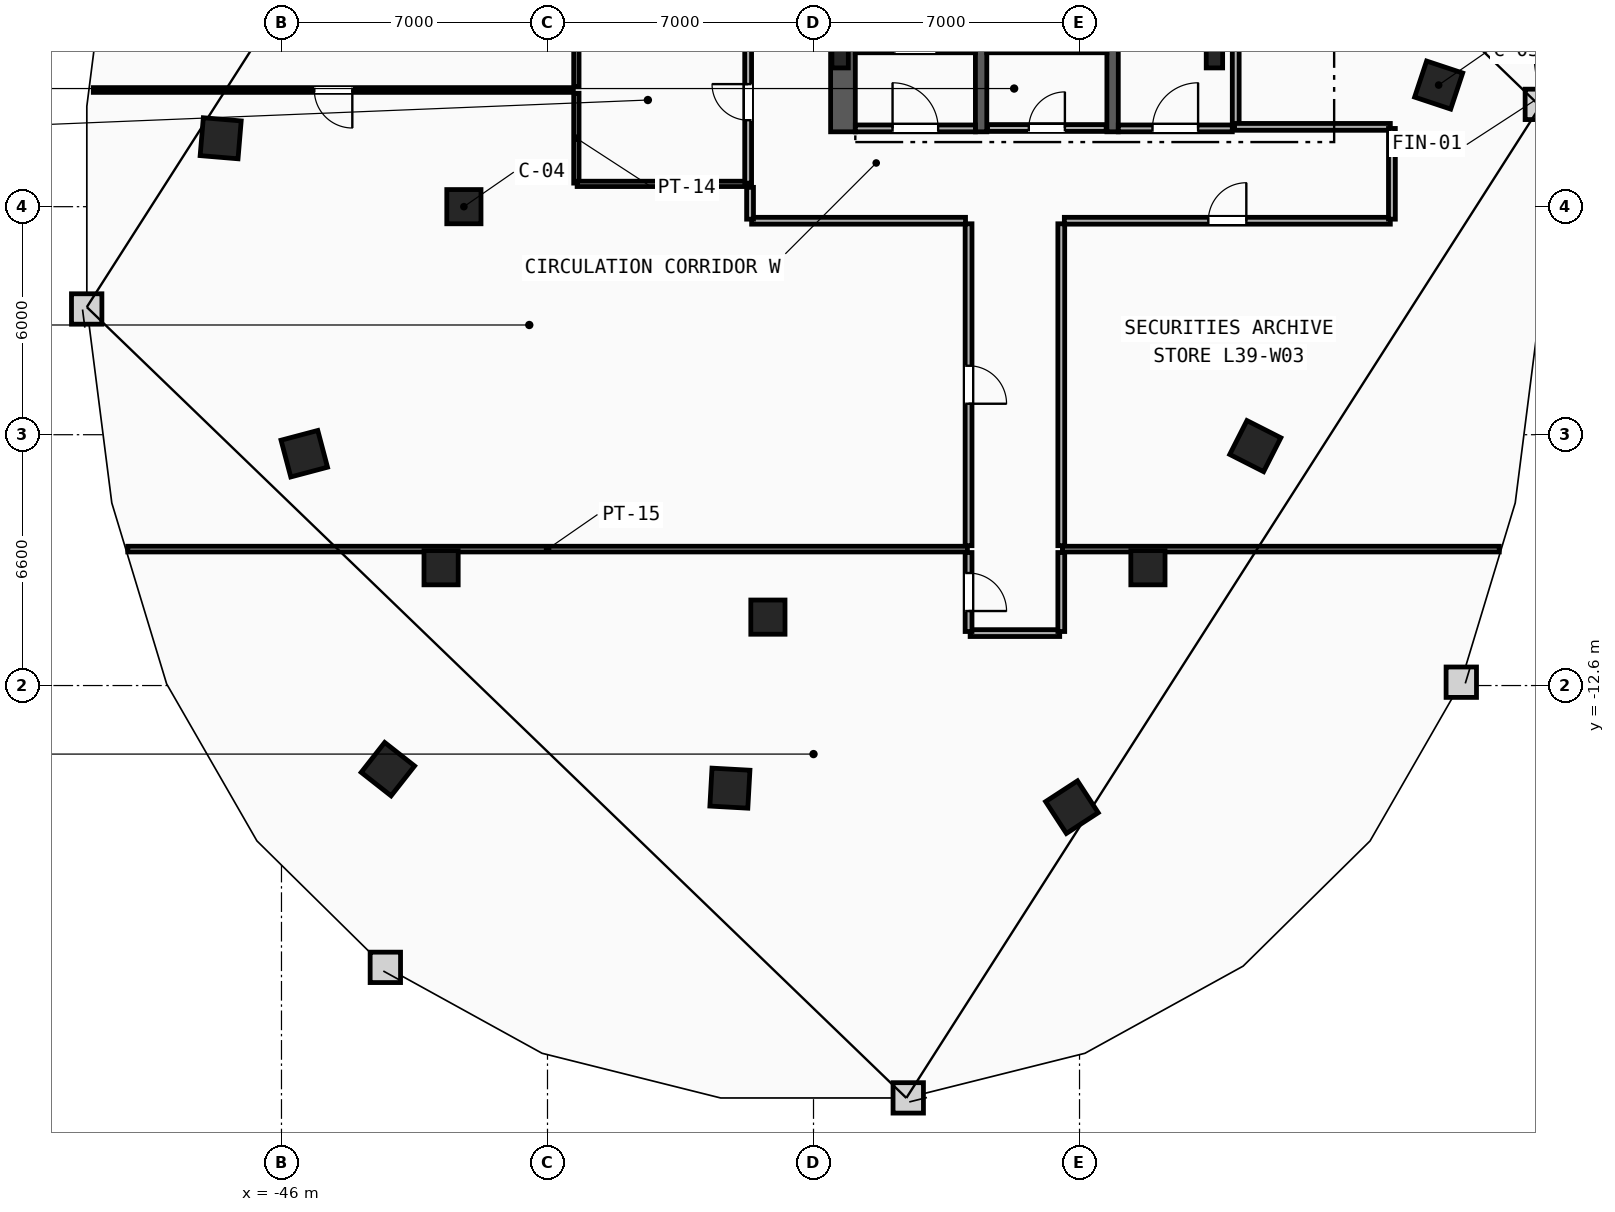
"""IFC4 building model, lengths in metres.
Left out: names, types, materials, properties, quantities, classifications, styles, units other than length and angle.
Written with IfcOpenShell. Run it as: python <this file> out.ifc"""

import sys

from ifc_helpers import new_model, si_unit, direction, frame, frame_2d, origin, origin_2d, place, context, subcontext, project, spatial, rectangle, i_section, extrude, element, fill, save


model = new_model("IFC4")
c1 = context("Model", 3, precision=1e-05, world=origin(), true_north=direction((0.0, 1.0)))
c2 = subcontext(c1, "Body", "Model", "MODEL_VIEW")
j1 = project(units=[si_unit("LENGTHUNIT", "METRE"), si_unit("PLANEANGLEUNIT", "RADIAN")], contexts=[c1])
p1 = place(None, origin())
s1 = spatial("IfcSite", under=j1, at=p1, CompositionType="ELEMENT")
p2 = place(p1, origin())
s2 = spatial("IfcBuilding", under=s1, at=p2, CompositionType="ELEMENT")
p3 = place(p2, frame((0.0, 0.0, 151.2)))
s3 = spatial("IfcBuildingStorey", under=s2, at=p3, CompositionType="ELEMENT", Elevation=151.2)
for number, where, z_axis, x_axis in (
    (1, (-31.3, 3.9, 0.0), (0.0, 0.0, 1.0), (1.0, 0.0, 0.0)),
    (2, (-21.45, 3.9, 0.0), (0.0, 0.0, 1.0), (1.0, 0.0, 0.0)),
):
    element("IfcColumn", number, at=place(p3, frame(where, z_axis=z_axis, x_axis=x_axis)), inside=s3, PredefinedType="COLUMN", context=c2, shape_type="SweptSolid", body=[
        extrude(i_section(OverallWidth=0.432, OverallDepth=0.498, WebThickness=0.056, FlangeThickness=0.089, FilletRadius=0.018, at=origin_2d()), origin(), (0.0, 0.0, 1.0), 3.6),
    ])
for number, where, z_axis, x_axis in (
    (3, (-41.2, 0.0, 0.0), (0.0, 0.0, 1.0), (1.0, 0.0, 0.0)),
    (4, (-41.8, -9.5, 0.0), (0.0, 0.0, 1.0), (1.0, 0.0, 0.0)),
    (5, (-33.2, -10.8, 0.0), (0.0, 0.0, 1.0), (1.0, 0.0, 0.0)),
    (6, (-23.2, -9.5, 0.0), (0.0, 0.0, 1.0), (1.0, 0.0, 0.0)),
):
    element("IfcColumn", number, at=place(p3, frame(where, z_axis=z_axis, x_axis=x_axis)), inside=s3, PredefinedType="COLUMN", context=c2, shape_type="SweptSolid", body=[
        extrude(rectangle(XDim=0.9, YDim=0.9, at=origin_2d()), origin(), (0.0, 0.0, 1.0), 3.6),
    ])
for number, where, z_axis, x_axis in (
    (7, (-15.55, 3.2, 0.0), (0.0, 0.0, 1.0), (0.315, 0.949, 0.0)),
    (8, (-47.6, 1.8, 0.0), (0.0, 0.0, 1.0), (-0.084, -0.997, 0.0)),
    (9, (-45.4, -6.5, 0.0), (0.0, 0.0, 1.0), (0.256, -0.967, 0.0)),
    (10, (-43.2, -14.8, 0.0), (0.0, 0.0, 1.0), (0.786, -0.618, 0.0)),
    (11, (-34.2, -15.3, 0.0), (0.0, 0.0, 1.0), (0.998, -0.055, 0.0)),
    (12, (-25.2, -15.8, 0.0), (0.0, 0.0, 1.0), (0.838, 0.546, 0.0)),
    (13, (-20.375, -6.3, 0.0), (0.0, 0.0, 1.0), (0.453, 0.892, 0.0)),
):
    element("IfcColumn", number, at=place(p3, frame(where, z_axis=z_axis, x_axis=x_axis)), inside=s3, PredefinedType="COLUMN", context=c2, shape_type="SweptSolid", body=[
        extrude(rectangle(XDim=1.0, YDim=1.0, at=origin_2d()), origin(), (0.0, 0.0, 1.0), 3.6),
    ])
p4 = place(p3, frame((-31.225, 1.97, 0.0), z_axis=(0.0, 0.0, 1.0), x_axis=(0.0, 1.0, 0.0)))
e14 = element("IfcWall", 14, at=p4, inside=s3, PredefinedType="SHEAR", context=c2, shape_type="SweptSolid", body=[
    extrude(rectangle(XDim=13.33, YDim=0.65, at=frame_2d((6.665, 0.0))), origin(), (0.0, 0.0, 1.0), 3.36),
])
for number, where, z_axis, x_axis in (
    (15, (-27.59, 1.97, 0.0), (0.0, 0.0, 1.0), (0.0, 1.0, 0.0)),
    (16, (-24.13, 1.97, 0.0), (0.0, 0.0, 1.0), (0.0, 1.0, 0.0)),
):
    element("IfcWall", number, at=place(p3, frame(where, z_axis=z_axis, x_axis=x_axis)), inside=s3, PredefinedType="SHEAR", context=c2, shape_type="SweptSolid", body=[
        extrude(rectangle(XDim=10.68, YDim=0.3, at=frame_2d((5.34, 0.0))), origin(), (0.0, 0.0, 1.0), 3.36),
    ])
p5 = place(p3, frame((-30.9, 4.2, 0.0), z_axis=(0.0, 0.0, 1.0), x_axis=(1.0, 0.0, 0.0)))
e17 = element("IfcWall", 17, at=p5, inside=s3, PredefinedType="SHEAR", context=c2, shape_type="SweptSolid", body=[
    extrude(rectangle(XDim=3.16, YDim=0.3, at=frame_2d((1.58, 0.0))), origin(), (0.0, 0.0, 1.0), 3.36),
])
p6 = place(p5, frame((1.03, 0.0, 0.0)))
e18 = element("IfcOpeningElement", 18, at=p6, cuts=e17, PredefinedType="OPENING", context=c2, shape_type="SweptSolid", body=[
    extrude(rectangle(XDim=1.1, YDim=2.15, at=frame_2d((0.55, 1.075))), frame((0.0, 0.16, 0.0), z_axis=(0.0, -1.0, 0.0), x_axis=(1.0, 0.0, 0.0)), (0.0, 0.0, 1.0), 0.32),
])
p7 = place(p3, frame((-27.44, 4.2, 0.0), z_axis=(0.0, 0.0, 1.0), x_axis=(1.0, 0.0, 0.0)))
e19 = element("IfcWall", 19, at=p7, inside=s3, PredefinedType="SHEAR", context=c2, shape_type="SweptSolid", body=[
    extrude(rectangle(XDim=3.16, YDim=0.3, at=frame_2d((1.58, 0.0))), origin(), (0.0, 0.0, 1.0), 3.36),
])
p8 = place(p3, frame((-20.89, 2.15, 0.0), z_axis=(0.0, 0.0, 1.0), x_axis=(0.0, 1.0, 0.0)))
e20 = element("IfcWall", 20, at=p8, inside=s3, PredefinedType="PARTITIONING", context=c2, shape_type="SweptSolid", body=[
    extrude(rectangle(XDim=5.3, YDim=0.18, at=frame_2d((2.65, 0.0))), origin(), (0.0, 0.0, 1.0), 3.36),
])
p9 = place(p3, frame((-23.98, 2.06, 0.0), z_axis=(0.0, 0.0, 1.0), x_axis=(1.0, 0.0, 0.0)))
e21 = element("IfcWall", 21, at=p9, inside=s3, PredefinedType="PARTITIONING", context=c2, shape_type="SweptSolid", body=[
    extrude(rectangle(XDim=3.0, YDim=0.18, at=frame_2d((1.5, 0.0))), origin(), (0.0, 0.0, 1.0), 3.36),
])
p10 = place(p9, frame((0.9, 0.0, 0.0)))
e22 = element("IfcOpeningElement", 22, at=p10, cuts=e21, PredefinedType="OPENING", context=c2, shape_type="SweptSolid", body=[
    extrude(rectangle(XDim=1.2, YDim=2.15, at=frame_2d((0.6, 1.075))), frame((0.0, 0.1, 0.0), z_axis=(0.0, -1.0, 0.0), x_axis=(1.0, 0.0, 0.0)), (0.0, 0.0, 1.0), 0.2),
])
p11 = place(p3, frame((-30.9, 2.06, 0.0), z_axis=(0.0, 0.0, 1.0), x_axis=(1.0, 0.0, 0.0)))
e23 = element("IfcWall", 23, at=p11, inside=s3, PredefinedType="PARTITIONING", context=c2, shape_type="SweptSolid", body=[
    extrude(rectangle(XDim=3.16, YDim=0.18, at=frame_2d((1.58, 0.0))), origin(), (0.0, 0.0, 1.0), 3.36),
])
p12 = place(p11, frame((0.98, 0.0, 0.0)))
e24 = element("IfcOpeningElement", 24, at=p12, cuts=e23, PredefinedType="OPENING", context=c2, shape_type="SweptSolid", body=[
    extrude(rectangle(XDim=1.2, YDim=2.15, at=frame_2d((0.6, 1.075))), frame((0.0, 0.1, 0.0), z_axis=(0.0, -1.0, 0.0), x_axis=(1.0, 0.0, 0.0)), (0.0, 0.0, 1.0), 0.2),
])
p13 = place(p3, frame((-27.42, 2.07, 0.0), z_axis=(0.0, 0.0, 1.0), x_axis=(1.0, 0.0, 0.0)))
e25 = element("IfcWall", 25, at=p13, inside=s3, PredefinedType="PARTITIONING", context=c2, shape_type="SweptSolid", body=[
    extrude(rectangle(XDim=3.12, YDim=0.18, at=frame_2d((1.56, 0.0))), origin(), (0.0, 0.0, 1.0), 3.36),
])
p14 = place(p13, frame((1.085, 0.0, 0.0)))
e26 = element("IfcOpeningElement", 26, at=p14, cuts=e25, PredefinedType="OPENING", context=c2, shape_type="SweptSolid", body=[
    extrude(rectangle(XDim=0.95, YDim=2.1, at=frame_2d((0.475, 1.05))), frame((0.0, 0.1, 0.0), z_axis=(0.0, -1.0, 0.0), x_axis=(1.0, 0.0, 0.0)), (0.0, 0.0, 1.0), 0.2),
])
p15 = place(p3, frame((-38.24, 0.62, 0.0), z_axis=(0.0, 0.0, 1.0), x_axis=(0.0, 1.0, 0.0)))
e27 = element("IfcWall", 27, at=p15, inside=s3, PredefinedType="PARTITIONING", context=c2, shape_type="SweptSolid", body=[
    extrude(rectangle(XDim=2.365, YDim=0.14, at=frame_2d((1.183, 0.0))), origin(), (0.0, 0.0, 1.0), 3.36),
])
p16 = place(p3, frame((-38.24, 3.155, 0.0), z_axis=(0.0, 0.0, 1.0), x_axis=(0.0, 1.0, 0.0)))
e28 = element("IfcWall", 28, at=p16, inside=s3, PredefinedType="PARTITIONING", context=c2, shape_type="SweptSolid", body=[
    extrude(rectangle(XDim=1.74, YDim=0.14, at=frame_2d((0.87, 0.0))), origin(), (0.0, 0.0, 1.0), 3.36),
])
p17 = place(p3, frame((-38.22, 0.6, 0.0), z_axis=(0.0, 0.0, 1.0), x_axis=(1.0, 0.0, 0.0)))
e29 = element("IfcWall", 29, at=p17, inside=s3, PredefinedType="PARTITIONING", context=c2, shape_type="SweptSolid", body=[
    extrude(rectangle(XDim=4.48, YDim=0.14, at=frame_2d((2.24, 0.0))), origin(), (0.0, 0.0, 1.0), 3.36),
])
p18 = place(p3, frame((-33.72, 0.62, 0.0), z_axis=(0.0, 0.0, 1.0), x_axis=(0.0, 1.0, 0.0)))
e30 = element("IfcWall", 30, at=p18, inside=s3, PredefinedType="PARTITIONING", context=c2, shape_type="SweptSolid", body=[
    extrude(rectangle(XDim=4.26, YDim=0.18, at=frame_2d((2.13, 0.0))), origin(), (0.0, 0.0, 1.0), 3.36),
])
p19 = place(p18, frame((1.655, 0.0, 0.0)))
e31 = element("IfcOpeningElement", 31, at=p19, cuts=e30, PredefinedType="OPENING", context=c2, shape_type="SweptSolid", body=[
    extrude(rectangle(XDim=0.95, YDim=2.1, at=frame_2d((0.475, 1.05))), frame((0.0, 0.1, 0.0), z_axis=(0.0, -1.0, 0.0), x_axis=(1.0, 0.0, 0.0)), (0.0, 0.0, 1.0), 0.2),
])
p20 = place(p3, frame((-50.045, -9.01, 0.0), z_axis=(0.0, 0.0, 1.0), x_axis=(1.0, 0.0, 0.0)))
e32 = element("IfcWall", 32, at=p20, inside=s3, PredefinedType="PARTITIONING", context=c2, shape_type="SweptSolid", body=[
    extrude(rectangle(XDim=22.095, YDim=0.15, at=frame_2d((11.048, 0.0))), origin(), (0.0, 0.0, 1.0), 3.36),
])
p21 = place(p3, frame((-25.45, -9.01, 0.0), z_axis=(0.0, 0.0, 1.0), x_axis=(1.0, 0.0, 0.0)))
e33 = element("IfcWall", 33, at=p21, inside=s3, PredefinedType="PARTITIONING", context=c2, shape_type="SweptSolid", body=[
    extrude(rectangle(XDim=11.495, YDim=0.15, at=frame_2d((5.748, 0.0))), origin(), (0.0, 0.0, 1.0), 3.36),
])
p22 = place(p3, frame((-27.878, -11.22, 0.0), z_axis=(0.0, 0.0, 1.0), x_axis=(1.0, 0.0, 0.0)))
e34 = element("IfcWall", 34, at=p22, inside=s3, PredefinedType="PARTITIONING", context=c2, shape_type="SweptSolid", body=[
    extrude(rectangle(XDim=2.357, YDim=0.18, at=frame_2d((1.178, 0.0))), origin(), (0.0, 0.0, 1.0), 3.36),
])
p23 = place(p3, frame((-27.92, -9.1, 0.0), z_axis=(0.0, 0.0, 1.0), x_axis=(0.0, -1.0, 0.0)))
e35 = element("IfcWall", 35, at=p23, inside=s3, PredefinedType="PARTITIONING", context=c2, shape_type="SweptSolid", body=[
    extrude(rectangle(XDim=2.078, YDim=0.18, at=frame_2d((1.039, 0.0))), origin(), (0.0, 0.0, 1.0), 3.36),
])
p24 = place(p23, frame((0.539, 0.0, 0.0)))
e36 = element("IfcOpeningElement", 36, at=p24, cuts=e35, PredefinedType="OPENING", context=c2, shape_type="SweptSolid", body=[
    extrude(rectangle(XDim=1.0, YDim=2.15, at=frame_2d((0.5, 1.075))), frame((0.0, 0.1, 0.0), z_axis=(0.0, -1.0, 0.0), x_axis=(1.0, 0.0, 0.0)), (0.0, 0.0, 1.0), 0.2),
])
p25 = place(p3, frame((-25.48, -11.178, 0.0), z_axis=(0.0, 0.0, 1.0), x_axis=(0.0, 1.0, 0.0)))
e37 = element("IfcWall", 37, at=p25, inside=s3, PredefinedType="PARTITIONING", context=c2, shape_type="SweptSolid", body=[
    extrude(rectangle(XDim=2.078, YDim=0.18, at=frame_2d((1.039, 0.0))), origin(), (0.0, 0.0, 1.0), 3.36),
])
p26 = place(p3, frame((-27.92, -0.45, 0.0), z_axis=(0.0, 0.0, 1.0), x_axis=(0.0, -1.0, 0.0)))
e38 = element("IfcWall", 38, at=p26, inside=s3, PredefinedType="PARTITIONING", context=c2, shape_type="SweptSolid", body=[
    extrude(rectangle(XDim=8.47, YDim=0.18, at=frame_2d((4.235, 0.0))), origin(), (0.0, 0.0, 1.0), 3.36),
])
p27 = place(p26, frame((3.735, 0.0, 0.0)))
e39 = element("IfcOpeningElement", 39, at=p27, cuts=e38, PredefinedType="OPENING", context=c2, shape_type="SweptSolid", body=[
    extrude(rectangle(XDim=1.0, YDim=2.15, at=frame_2d((0.5, 1.075))), frame((0.0, 0.1, 0.0), z_axis=(0.0, -1.0, 0.0), x_axis=(1.0, 0.0, 0.0)), (0.0, 0.0, 1.0), 0.2),
])
p28 = place(p3, frame((-33.628, -0.37, 0.0), z_axis=(0.0, 0.0, 1.0), x_axis=(1.0, 0.0, 0.0)))
e40 = element("IfcWall", 40, at=p28, inside=s3, PredefinedType="PARTITIONING", context=c2, shape_type="SweptSolid", body=[
    extrude(rectangle(XDim=5.628, YDim=0.18, at=frame_2d((2.814, 0.0))), origin(), (0.0, 0.0, 1.0), 3.36),
])
p29 = place(p3, frame((-33.67, 0.509, 0.0), z_axis=(0.0, 0.0, 1.0), x_axis=(0.0, -1.0, 0.0)))
e41 = element("IfcWall", 41, at=p29, inside=s3, PredefinedType="PARTITIONING", context=c2, shape_type="SweptSolid", body=[
    extrude(rectangle(XDim=0.837, YDim=0.18, at=frame_2d((0.418, 0.0))), origin(), (0.0, 0.0, 1.0), 3.36),
])
p30 = place(p3, frame((-25.4, -0.37, 0.0), z_axis=(0.0, 0.0, 1.0), x_axis=(1.0, 0.0, 0.0)))
e42 = element("IfcWall", 42, at=p30, inside=s3, PredefinedType="PARTITIONING", context=c2, shape_type="SweptSolid", body=[
    extrude(rectangle(XDim=8.578, YDim=0.18, at=frame_2d((4.289, 0.0))), origin(), (0.0, 0.0, 1.0), 3.36),
])
p31 = place(p30, frame((3.789, 0.0, 0.0)))
e43 = element("IfcOpeningElement", 43, at=p31, cuts=e42, PredefinedType="OPENING", context=c2, shape_type="SweptSolid", body=[
    extrude(rectangle(XDim=1.0, YDim=2.15, at=frame_2d((0.5, 1.075))), frame((0.0, 0.1, 0.0), z_axis=(0.0, -1.0, 0.0), x_axis=(1.0, 0.0, 0.0)), (0.0, 0.0, 1.0), 0.2),
])
p32 = place(p3, frame((-25.48, -8.92, 0.0), z_axis=(0.0, 0.0, 1.0), x_axis=(0.0, 1.0, 0.0)))
e44 = element("IfcWall", 44, at=p32, inside=s3, PredefinedType="PARTITIONING", context=c2, shape_type="SweptSolid", body=[
    extrude(rectangle(XDim=8.47, YDim=0.18, at=frame_2d((4.235, 0.0))), origin(), (0.0, 0.0, 1.0), 3.36),
])
p33 = place(p3, frame((-16.822, 2.1, 0.0), z_axis=(0.0, 0.0, 1.0), x_axis=(-1.0, 0.0, 0.0)))
e45 = element("IfcWall", 45, at=p33, inside=s3, PredefinedType="PARTITIONING", context=c2, shape_type="SweptSolid", body=[
    extrude(rectangle(XDim=4.098, YDim=0.18, at=frame_2d((2.049, 0.0))), origin(), (0.0, 0.0, 1.0), 3.36),
])
p34 = place(p3, frame((-16.78, -0.329, 0.0), z_axis=(0.0, 0.0, 1.0), x_axis=(0.0, 1.0, 0.0)))
e46 = element("IfcWall", 46, at=p34, inside=s3, PredefinedType="PARTITIONING", context=c2, shape_type="SweptSolid", body=[
    extrude(rectangle(XDim=2.387, YDim=0.18, at=frame_2d((1.194, 0.0))), origin(), (0.0, 0.0, 1.0), 3.36),
])
p35 = place(p3, frame((-38.32, 3.07, 0.0), z_axis=(0.0, 0.0, 1.0), x_axis=(-1.0, 0.0, 0.0)))
e47 = element("IfcWall", 47, at=p35, inside=s3, PredefinedType="PARTITIONING", context=c2, shape_type="SweptSolid", body=[
    extrude(rectangle(XDim=12.631, YDim=0.125, at=frame_2d((6.316, 0.0))), origin(), (0.0, 0.0, 1.0), 3.36),
])
p36 = place(p35, frame((5.816, 0.0, 0.0)))
e48 = element("IfcOpeningElement", 48, at=p36, cuts=e47, PredefinedType="OPENING", context=c2, shape_type="SweptSolid", body=[
    extrude(rectangle(XDim=1.0, YDim=2.15, at=frame_2d((0.5, 1.075))), frame((0.0, 0.073, 0.0), z_axis=(0.0, -1.0, 0.0), x_axis=(1.0, 0.0, 0.0)), (0.0, 0.0, 1.0), 0.145),
])
p37 = place(p10, origin())
e49 = element("IfcDoor", 49, at=p37, inside=s3, OperationType="SINGLE_SWING_RIGHT", PredefinedType="DOOR", context=c2, shape_type="SweptSolid", body=[
    extrude(rectangle(XDim=1.2, YDim=2.15, at=frame_2d((0.6, 1.075))), frame((0.0, 0.025, 0.0), z_axis=(0.0, -1.0, 0.0), x_axis=(1.0, 0.0, 0.0)), (0.0, 0.0, 1.0), 0.05),
])
fill(e22, e49)
p38 = place(p12, origin())
e50 = element("IfcDoor", 50, at=p38, inside=s3, OperationType="SINGLE_SWING_LEFT", PredefinedType="DOOR", context=c2, shape_type="SweptSolid", body=[
    extrude(rectangle(XDim=1.2, YDim=2.15, at=frame_2d((0.6, 1.075))), frame((0.0, 0.025, 0.0), z_axis=(0.0, -1.0, 0.0), x_axis=(1.0, 0.0, 0.0)), (0.0, 0.0, 1.0), 0.05),
])
fill(e24, e50)
p39 = place(p36, origin())
e51 = element("IfcDoor", 51, at=p39, inside=s3, OperationType="SINGLE_SWING_LEFT", PredefinedType="DOOR", context=c2, shape_type="SweptSolid", body=[
    extrude(rectangle(XDim=1.0, YDim=2.15, at=frame_2d((0.5, 1.075))), frame((0.0, 0.025, 0.0), z_axis=(0.0, -1.0, 0.0), x_axis=(1.0, 0.0, 0.0)), (0.0, 0.0, 1.0), 0.05),
])
fill(e48, e51)
p40 = place(p31, origin())
e52 = element("IfcDoor", 52, at=p40, inside=s3, OperationType="SINGLE_SWING_RIGHT", PredefinedType="DOOR", context=c2, shape_type="SweptSolid", body=[
    extrude(rectangle(XDim=1.0, YDim=2.15, at=frame_2d((0.5, 1.075))), frame((0.0, 0.025, 0.0), z_axis=(0.0, -1.0, 0.0), x_axis=(1.0, 0.0, 0.0)), (0.0, 0.0, 1.0), 0.05),
])
fill(e43, e52)
p41 = place(p27, origin())
e53 = element("IfcDoor", 53, at=p41, inside=s3, OperationType="SINGLE_SWING_RIGHT", PredefinedType="DOOR", context=c2, shape_type="SweptSolid", body=[
    extrude(rectangle(XDim=1.0, YDim=2.15, at=frame_2d((0.5, 1.075))), frame((0.0, 0.025, 0.0), z_axis=(0.0, -1.0, 0.0), x_axis=(1.0, 0.0, 0.0)), (0.0, 0.0, 1.0), 0.05),
])
fill(e39, e53)
p42 = place(p19, origin())
e54 = element("IfcDoor", 54, at=p42, inside=s3, OperationType="SINGLE_SWING_RIGHT", PredefinedType="DOOR", context=c2, shape_type="SweptSolid", body=[
    extrude(rectangle(XDim=0.95, YDim=2.1, at=frame_2d((0.475, 1.05))), frame((0.0, 0.025, 0.0), z_axis=(0.0, -1.0, 0.0), x_axis=(1.0, 0.0, 0.0)), (0.0, 0.0, 1.0), 0.05),
])
fill(e31, e54)
p43 = place(p14, origin())
e55 = element("IfcDoor", 55, at=p43, inside=s3, OperationType="SINGLE_SWING_RIGHT", PredefinedType="DOOR", context=c2, shape_type="SweptSolid", body=[
    extrude(rectangle(XDim=0.95, YDim=2.1, at=frame_2d((0.475, 1.05))), frame((0.0, 0.025, 0.0), z_axis=(0.0, -1.0, 0.0), x_axis=(1.0, 0.0, 0.0)), (0.0, 0.0, 1.0), 0.05),
])
fill(e26, e55)
p44 = place(p24, origin())
e56 = element("IfcDoor", 56, at=p44, inside=s3, OperationType="SINGLE_SWING_RIGHT", PredefinedType="DOOR", context=c2, shape_type="SweptSolid", body=[
    extrude(rectangle(XDim=1.0, YDim=2.15, at=frame_2d((0.5, 1.075))), frame((0.0, 0.025, 0.0), z_axis=(0.0, -1.0, 0.0), x_axis=(1.0, 0.0, 0.0)), (0.0, 0.0, 1.0), 0.05),
])
fill(e36, e56)
save(model, sys.argv[1])
